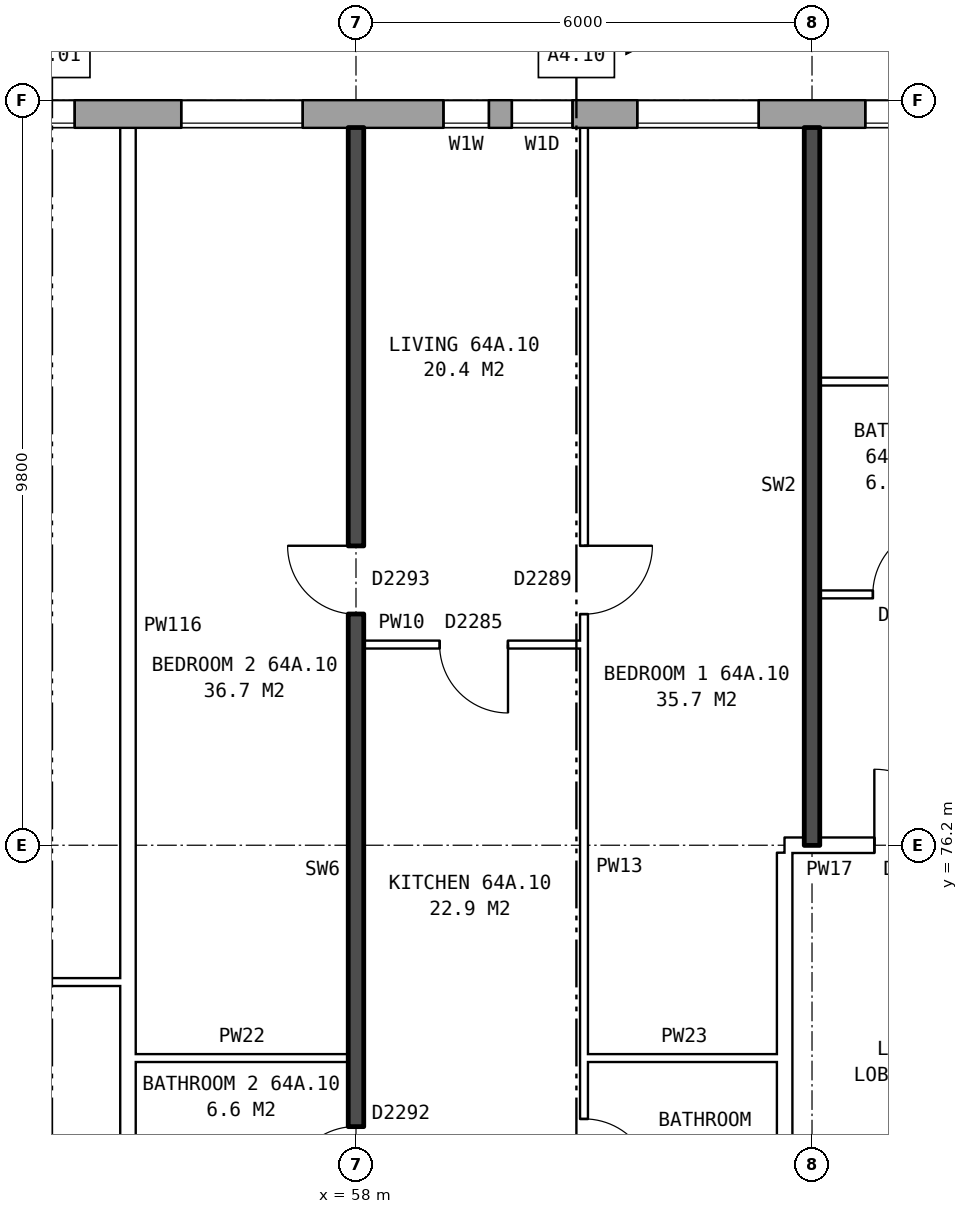
"""IFC4 building model, lengths in metres.
Left out: names, types, materials, properties, quantities, classifications, styles, units other than length and angle.
Written with IfcOpenShell. Run it as: python <this file> out.ifc"""

import sys

from ifc_helpers import new_model, si_unit, direction, frame, frame_2d, origin, place, context, subcontext, project, spatial, rectangle, extrude, element, fill, save


model = new_model("IFC4")
c1 = context("Model", 3, precision=1e-05, world=origin(), true_north=direction((0.0, 1.0)))
c2 = subcontext(c1, "Body", "Model", "MODEL_VIEW")
j1 = project(units=[si_unit("LENGTHUNIT", "METRE"), si_unit("PLANEANGLEUNIT", "RADIAN")], contexts=[c1])
p1 = place(None, origin())
s1 = spatial("IfcSite", under=j1, at=p1, CompositionType="ELEMENT")
p2 = place(p1, origin())
s2 = spatial("IfcBuilding", under=s1, at=p2, CompositionType="ELEMENT")
p3 = place(p2, frame((0.0, 0.0, 227.6)))
s3 = spatial("IfcBuildingStorey", under=s2, at=p3, CompositionType="ELEMENT", Elevation=227.6)
p4 = place(p3, frame((74.95, 85.82, 0.0), z_axis=(0.0, 0.0, 1.0), x_axis=(-1.0, 0.0, 0.0)))
e1 = element("IfcWall", 1, at=p4, inside=s3, PredefinedType="STANDARD", context=c2, shape_type="SweptSolid", body=[
    extrude(rectangle(XDim=39.875, YDim=0.36, at=frame_2d((19.938, 0.0))), origin(), (0.0, 0.0, 1.0), 2.85),
])
p5 = place(p4, frame((2.65, 0.0, 0.8)))
e2 = element("IfcOpeningElement", 2, at=p5, cuts=e1, PredefinedType="OPENING", context=c2, shape_type="SweptSolid", body=[
    extrude(rectangle(XDim=1.6, YDim=1.8, at=frame_2d((0.8, 0.9))), frame((0.0, 0.19, 0.0), z_axis=(0.0, -1.0, 0.0), x_axis=(1.0, 0.0, 0.0)), (0.0, 0.0, 1.0), 0.38),
])
p6 = place(p4, frame((5.65, 0.0, 0.8)))
e3 = element("IfcOpeningElement", 3, at=p6, cuts=e1, PredefinedType="OPENING", context=c2, shape_type="SweptSolid", body=[
    extrude(rectangle(XDim=1.6, YDim=1.8, at=frame_2d((0.8, 0.9))), frame((0.0, 0.19, 0.0), z_axis=(0.0, -1.0, 0.0), x_axis=(1.0, 0.0, 0.0)), (0.0, 0.0, 1.0), 0.38),
])
p7 = place(p4, frame((8.65, 0.0, 0.8)))
e4 = element("IfcOpeningElement", 4, at=p7, cuts=e1, PredefinedType="OPENING", context=c2, shape_type="SweptSolid", body=[
    extrude(rectangle(XDim=1.6, YDim=1.8, at=frame_2d((0.8, 0.9))), frame((0.0, 0.19, 0.0), z_axis=(0.0, -1.0, 0.0), x_axis=(1.0, 0.0, 0.0)), (0.0, 0.0, 1.0), 0.38),
])
p8 = place(p4, frame((11.65, 0.0, 0.8)))
e5 = element("IfcOpeningElement", 5, at=p8, cuts=e1, PredefinedType="OPENING", context=c2, shape_type="SweptSolid", body=[
    extrude(rectangle(XDim=1.6, YDim=1.8, at=frame_2d((0.8, 0.9))), frame((0.0, 0.19, 0.0), z_axis=(0.0, -1.0, 0.0), x_axis=(1.0, 0.0, 0.0)), (0.0, 0.0, 1.0), 0.38),
])
p9 = place(p4, frame((14.1, 0.0, 0.8)))
e6 = element("IfcOpeningElement", 6, at=p9, cuts=e1, PredefinedType="OPENING", context=c2, shape_type="SweptSolid", body=[
    extrude(rectangle(XDim=0.8, YDim=1.8, at=frame_2d((0.4, 0.9))), frame((0.0, 0.19, 0.0), z_axis=(0.0, -1.0, 0.0), x_axis=(1.0, 0.0, 0.0)), (0.0, 0.0, 1.0), 0.38),
])
p10 = place(p4, frame((17.65, 0.0, 0.8)))
e7 = element("IfcOpeningElement", 7, at=p10, cuts=e1, PredefinedType="OPENING", context=c2, shape_type="SweptSolid", body=[
    extrude(rectangle(XDim=1.6, YDim=1.8, at=frame_2d((0.8, 0.9))), frame((0.0, 0.19, 0.0), z_axis=(0.0, -1.0, 0.0), x_axis=(1.0, 0.0, 0.0)), (0.0, 0.0, 1.0), 0.38),
])
p11 = place(p4, frame((20.65, 0.0, 0.8)))
e8 = element("IfcOpeningElement", 8, at=p11, cuts=e1, PredefinedType="OPENING", context=c2, shape_type="SweptSolid", body=[
    extrude(rectangle(XDim=1.6, YDim=1.8, at=frame_2d((0.8, 0.9))), frame((0.0, 0.19, 0.0), z_axis=(0.0, -1.0, 0.0), x_axis=(1.0, 0.0, 0.0)), (0.0, 0.0, 1.0), 0.38),
])
p12 = place(p4, frame((23.15, 0.0, 0.75)))
e9 = element("IfcOpeningElement", 9, at=p12, cuts=e1, PredefinedType="OPENING", context=c2, shape_type="SweptSolid", body=[
    extrude(rectangle(XDim=1.2, YDim=1.8, at=frame_2d((0.6, 0.9))), frame((0.0, 0.19, 0.0), z_axis=(0.0, -1.0, 0.0), x_axis=(1.0, 0.0, 0.0)), (0.0, 0.0, 1.0), 0.38),
])
p13 = place(p4, frame((26.65, 0.0, 0.8)))
e10 = element("IfcOpeningElement", 10, at=p13, cuts=e1, PredefinedType="OPENING", context=c2, shape_type="SweptSolid", body=[
    extrude(rectangle(XDim=1.6, YDim=1.8, at=frame_2d((0.8, 0.9))), frame((0.0, 0.19, 0.0), z_axis=(0.0, -1.0, 0.0), x_axis=(1.0, 0.0, 0.0)), (0.0, 0.0, 1.0), 0.38),
])
p14 = place(p4, frame((29.65, 0.0, 0.8)))
e11 = element("IfcOpeningElement", 11, at=p14, cuts=e1, PredefinedType="OPENING", context=c2, shape_type="SweptSolid", body=[
    extrude(rectangle(XDim=1.6, YDim=1.8, at=frame_2d((0.8, 0.9))), frame((0.0, 0.19, 0.0), z_axis=(0.0, -1.0, 0.0), x_axis=(1.0, 0.0, 0.0)), (0.0, 0.0, 1.0), 0.38),
])
p15 = place(p4, frame((32.65, 0.0, 0.8)))
e12 = element("IfcOpeningElement", 12, at=p15, cuts=e1, PredefinedType="OPENING", context=c2, shape_type="SweptSolid", body=[
    extrude(rectangle(XDim=1.6, YDim=1.8, at=frame_2d((0.8, 0.9))), frame((0.0, 0.19, 0.0), z_axis=(0.0, -1.0, 0.0), x_axis=(1.0, 0.0, 0.0)), (0.0, 0.0, 1.0), 0.38),
])
p16 = place(p4, frame((35.65, 0.0, 0.8)))
e13 = element("IfcOpeningElement", 13, at=p16, cuts=e1, PredefinedType="OPENING", context=c2, shape_type="SweptSolid", body=[
    extrude(rectangle(XDim=1.6, YDim=1.8, at=frame_2d((0.8, 0.9))), frame((0.0, 0.19, 0.0), z_axis=(0.0, -1.0, 0.0), x_axis=(1.0, 0.0, 0.0)), (0.0, 0.0, 1.0), 0.38),
])
p17 = place(p4, frame((15.2, 0.0, 1.7)))
e14 = element("IfcOpeningElement", 14, at=p17, cuts=e1, PredefinedType="OPENING", context=c2, shape_type="SweptSolid", body=[
    extrude(rectangle(XDim=0.6, YDim=0.9, at=frame_2d((0.3, 0.45))), frame((0.0, 0.19, 0.0), z_axis=(0.0, -1.0, 0.0), x_axis=(1.0, 0.0, 0.0)), (0.0, 0.0, 1.0), 0.38),
])
p18 = place(p4, frame((24.65, 0.0, 0.35)))
e15 = element("IfcOpeningElement", 15, at=p18, cuts=e1, PredefinedType="OPENING", context=c2, shape_type="SweptSolid", body=[
    extrude(rectangle(XDim=0.6, YDim=0.9, at=frame_2d((0.3, 0.45))), frame((0.0, 0.19, 0.0), z_axis=(0.0, -1.0, 0.0), x_axis=(1.0, 0.0, 0.0)), (0.0, 0.0, 1.0), 0.38),
])
p19 = place(p3, frame((63.64, 63.9, 0.0), z_axis=(0.0, 0.0, 1.0), x_axis=(0.0, 1.0, 0.0)))
e16 = element("IfcWall", 16, at=p19, inside=s3, PredefinedType="PARTITIONING", context=c2, shape_type="SweptSolid", body=[
    extrude(rectangle(XDim=12.2, YDim=0.2, at=frame_2d((6.1, 0.0))), origin(), (0.0, 0.0, 1.0), 2.85),
])
p20 = place(p19, frame((5.1, 0.0, 0.0)))
e17 = element("IfcOpeningElement", 17, at=p20, cuts=e16, PredefinedType="OPENING", context=c2, shape_type="SweptSolid", body=[
    extrude(rectangle(XDim=2.0, YDim=2.1, at=frame_2d((1.0, 1.05))), frame((0.0, 0.11, 0.0), z_axis=(0.0, -1.0, 0.0), x_axis=(1.0, 0.0, 0.0)), (0.0, 0.0, 1.0), 0.22),
])
p21 = place(p3, frame((55.1, 73.4, 0.0), z_axis=(0.0, 0.0, 1.0), x_axis=(1.0, 0.0, 0.0)))
e18 = element("IfcWall", 18, at=p21, inside=s3, PredefinedType="PARTITIONING", context=c2, shape_type="SweptSolid", body=[
    extrude(rectangle(XDim=2.8, YDim=0.1, at=frame_2d((1.4, 0.0))), origin(), (0.0, 0.0, 1.0), 2.85),
])
p22 = place(p3, frame((61.0, 73.4, 0.0), z_axis=(0.0, 0.0, 1.0), x_axis=(1.0, 0.0, 0.0)))
e19 = element("IfcWall", 19, at=p22, inside=s3, PredefinedType="PARTITIONING", context=c2, shape_type="SweptSolid", body=[
    extrude(rectangle(XDim=2.64, YDim=0.1, at=frame_2d((1.32, 0.0))), origin(), (0.0, 0.0, 1.0), 2.85),
])
p23 = place(p3, frame((52.1, 74.4, 0.0), z_axis=(0.0, 0.0, 1.0), x_axis=(1.0, 0.0, 0.0)))
e20 = element("IfcWall", 20, at=p23, inside=s3, PredefinedType="PARTITIONING", context=c2, shape_type="SweptSolid", body=[
    extrude(rectangle(XDim=2.8, YDim=0.1, at=frame_2d((1.4, 0.0))), origin(), (0.0, 0.0, 1.0), 2.85),
])
p24 = place(p3, frame((63.64, 76.2, 0.0), z_axis=(0.0, 0.0, 1.0), x_axis=(1.0, 0.0, 0.0)))
e21 = element("IfcWall", 21, at=p24, inside=s3, PredefinedType="PARTITIONING", context=c2, shape_type="SweptSolid", body=[
    extrude(rectangle(XDim=3.0, YDim=0.2, at=frame_2d((1.5, 0.0))), origin(), (0.0, 0.0, 1.0), 2.85),
])
p25 = place(p24, frame((1.18, 0.0, 0.0)))
e22 = element("IfcOpeningElement", 22, at=p25, cuts=e21, PredefinedType="OPENING", context=c2, shape_type="SweptSolid", body=[
    extrude(rectangle(XDim=1.0, YDim=2.1, at=frame_2d((0.5, 1.05))), frame((0.0, 0.11, 0.0), z_axis=(0.0, -1.0, 0.0), x_axis=(1.0, 0.0, 0.0)), (0.0, 0.0, 1.0), 0.22),
])
p26 = place(p3, frame((58.1, 78.84, 0.0), z_axis=(0.0, 0.0, 1.0), x_axis=(1.0, 0.0, 0.0)))
e23 = element("IfcWall", 23, at=p26, inside=s3, PredefinedType="PARTITIONING", context=c2, shape_type="SweptSolid", body=[
    extrude(rectangle(XDim=2.9, YDim=0.1, at=frame_2d((1.45, 0.0))), origin(), (0.0, 0.0, 1.0), 2.85),
])
p27 = place(p26, frame((1.0, 0.0, 0.0)))
e24 = element("IfcOpeningElement", 24, at=p27, cuts=e23, PredefinedType="OPENING", context=c2, shape_type="SweptSolid", body=[
    extrude(rectangle(XDim=0.9, YDim=2.1, at=frame_2d((0.45, 1.05))), frame((0.0, 0.06, 0.0), z_axis=(0.0, -1.0, 0.0), x_axis=(1.0, 0.0, 0.0)), (0.0, 0.0, 1.0), 0.12),
])
p28 = place(p3, frame((64.1, 79.5, 0.0), z_axis=(0.0, 0.0, 1.0), x_axis=(1.0, 0.0, 0.0)))
e25 = element("IfcWall", 25, at=p28, inside=s3, PredefinedType="PARTITIONING", context=c2, shape_type="SweptSolid", body=[
    extrude(rectangle(XDim=11.8, YDim=0.1, at=frame_2d((5.9, 0.0))), origin(), (0.0, 0.0, 1.0), 2.85),
])
p29 = place(p28, frame((3.65, 0.0, 0.0)))
e26 = element("IfcOpeningElement", 26, at=p29, cuts=e25, PredefinedType="OPENING", context=c2, shape_type="SweptSolid", body=[
    extrude(rectangle(XDim=0.9, YDim=2.1, at=frame_2d((0.45, 1.05))), frame((0.0, 0.06, 0.0), z_axis=(0.0, -1.0, 0.0), x_axis=(1.0, 0.0, 0.0)), (0.0, 0.0, 1.0), 0.12),
])
p30 = place(p28, frame((0.7, 0.0, 0.0)))
e27 = element("IfcOpeningElement", 27, at=p30, cuts=e25, PredefinedType="OPENING", context=c2, shape_type="SweptSolid", body=[
    extrude(rectangle(XDim=0.9, YDim=2.1, at=frame_2d((0.45, 1.05))), frame((0.0, 0.06, 0.0), z_axis=(0.0, -1.0, 0.0), x_axis=(1.0, 0.0, 0.0)), (0.0, 0.0, 1.0), 0.12),
])
p31 = place(p3, frame((64.1, 82.3, 0.0), z_axis=(0.0, 0.0, 1.0), x_axis=(1.0, 0.0, 0.0)))
e28 = element("IfcWall", 28, at=p31, inside=s3, PredefinedType="PARTITIONING", context=c2, shape_type="SweptSolid", body=[
    extrude(rectangle(XDim=2.3, YDim=0.1, at=frame_2d((1.15, 0.0))), origin(), (0.0, 0.0, 1.0), 2.85),
])
p32 = place(p3, frame((55.0, 71.3, 0.0), z_axis=(0.0, 0.0, 1.0), x_axis=(0.0, 1.0, 0.0)))
e29 = element("IfcWall", 29, at=p32, inside=s3, PredefinedType="PARTITIONING", context=c2, shape_type="SweptSolid", body=[
    extrude(rectangle(XDim=14.34, YDim=0.2, at=frame_2d((7.17, 0.0))), origin(), (0.0, 0.0, 1.0), 2.85),
])
p33 = place(p3, frame((58.0, 71.2, 0.0), z_axis=(0.0, 0.0, 1.0), x_axis=(0.0, 1.0, 0.0)))
e30 = element("IfcWall", 30, at=p33, inside=s3, PredefinedType="SOLIDWALL", context=c2, shape_type="SweptSolid", body=[
    extrude(rectangle(XDim=14.44, YDim=0.2, at=frame_2d((7.22, 0.0))), origin(), (0.0, 0.0, 1.0), 2.85),
])
p34 = place(p33, frame((8.04, 0.0, 0.0)))
e31 = element("IfcOpeningElement", 31, at=p34, cuts=e30, PredefinedType="OPENING", context=c2, shape_type="SweptSolid", body=[
    extrude(rectangle(XDim=0.9, YDim=2.1, at=frame_2d((0.45, 1.05))), frame((0.0, 0.11, 0.0), z_axis=(0.0, -1.0, 0.0), x_axis=(1.0, 0.0, 0.0)), (0.0, 0.0, 1.0), 0.22),
])
p35 = place(p33, frame((0.4, 0.0, 0.0)))
e32 = element("IfcOpeningElement", 32, at=p35, cuts=e30, PredefinedType="OPENING", context=c2, shape_type="SweptSolid", body=[
    extrude(rectangle(XDim=0.9, YDim=2.1, at=frame_2d((0.45, 1.05))), frame((0.0, 0.11, 0.0), z_axis=(0.0, -1.0, 0.0), x_axis=(1.0, 0.0, 0.0)), (0.0, 0.0, 1.0), 0.22),
])
p36 = place(p3, frame((61.0, 71.3, 0.0), z_axis=(0.0, 0.0, 1.0), x_axis=(0.0, 1.0, 0.0)))
e33 = element("IfcWall", 33, at=p36, inside=s3, PredefinedType="PARTITIONING", context=c2, shape_type="SweptSolid", body=[
    extrude(rectangle(XDim=14.34, YDim=0.1, at=frame_2d((7.17, 0.0))), origin(), (0.0, 0.0, 1.0), 2.85),
])
p37 = place(p36, frame((7.94, 0.0, 0.0)))
e34 = element("IfcOpeningElement", 34, at=p37, cuts=e33, PredefinedType="OPENING", context=c2, shape_type="SweptSolid", body=[
    extrude(rectangle(XDim=0.9, YDim=2.1, at=frame_2d((0.45, 1.05))), frame((0.0, 0.06, 0.0), z_axis=(0.0, -1.0, 0.0), x_axis=(1.0, 0.0, 0.0)), (0.0, 0.0, 1.0), 0.12),
])
p38 = place(p36, frame((0.4, 0.0, 0.0)))
e35 = element("IfcOpeningElement", 35, at=p38, cuts=e33, PredefinedType="OPENING", context=c2, shape_type="SweptSolid", body=[
    extrude(rectangle(XDim=0.9, YDim=2.1, at=frame_2d((0.45, 1.05))), frame((0.0, 0.06, 0.0), z_axis=(0.0, -1.0, 0.0), x_axis=(1.0, 0.0, 0.0)), (0.0, 0.0, 1.0), 0.12),
])
p39 = place(p3, frame((64.0, 76.2, 0.0), z_axis=(0.0, 0.0, 1.0), x_axis=(0.0, 1.0, 0.0)))
e36 = element("IfcWall", 36, at=p39, inside=s3, PredefinedType="SOLIDWALL", context=c2, shape_type="SweptSolid", body=[
    extrude(rectangle(XDim=9.44, YDim=0.2, at=frame_2d((4.72, 0.0))), origin(), (0.0, 0.0, 1.0), 2.85),
])
p40 = place(p7, origin())
e37 = element("IfcWindow", 37, at=p40, inside=s3, PartitioningType="SINGLE_PANEL", PredefinedType="WINDOW", context=c2, shape_type="SweptSolid", body=[
    extrude(rectangle(XDim=1.6, YDim=1.8, at=frame_2d((0.8, 0.9))), frame((0.0, 0.15, 0.0), z_axis=(0.0, -1.0, 0.0), x_axis=(1.0, 0.0, 0.0)), (0.0, 0.0, 1.0), 0.06),
])
fill(e4, e37)
p41 = place(p8, origin())
e38 = element("IfcWindow", 38, at=p41, inside=s3, PartitioningType="SINGLE_PANEL", PredefinedType="WINDOW", context=c2, shape_type="SweptSolid", body=[
    extrude(rectangle(XDim=1.6, YDim=1.8, at=frame_2d((0.8, 0.9))), frame((0.0, 0.15, 0.0), z_axis=(0.0, -1.0, 0.0), x_axis=(1.0, 0.0, 0.0)), (0.0, 0.0, 1.0), 0.06),
])
fill(e5, e38)
p42 = place(p9, origin())
e39 = element("IfcWindow", 39, at=p42, inside=s3, PartitioningType="SINGLE_PANEL", PredefinedType="WINDOW", context=c2, shape_type="SweptSolid", body=[
    extrude(rectangle(XDim=0.8, YDim=1.8, at=frame_2d((0.4, 0.9))), frame((0.0, 0.15, 0.0), z_axis=(0.0, -1.0, 0.0), x_axis=(1.0, 0.0, 0.0)), (0.0, 0.0, 1.0), 0.06),
])
fill(e6, e39)
p43 = place(p10, origin())
e40 = element("IfcWindow", 40, at=p43, inside=s3, PartitioningType="SINGLE_PANEL", PredefinedType="WINDOW", context=c2, shape_type="SweptSolid", body=[
    extrude(rectangle(XDim=1.6, YDim=1.8, at=frame_2d((0.8, 0.9))), frame((0.0, 0.15, 0.0), z_axis=(0.0, -1.0, 0.0), x_axis=(1.0, 0.0, 0.0)), (0.0, 0.0, 1.0), 0.06),
])
fill(e7, e40)
p44 = place(p11, origin())
e41 = element("IfcWindow", 41, at=p44, inside=s3, PartitioningType="SINGLE_PANEL", PredefinedType="WINDOW", context=c2, shape_type="SweptSolid", body=[
    extrude(rectangle(XDim=1.6, YDim=1.8, at=frame_2d((0.8, 0.9))), frame((0.0, 0.15, 0.0), z_axis=(0.0, -1.0, 0.0), x_axis=(1.0, 0.0, 0.0)), (0.0, 0.0, 1.0), 0.06),
])
fill(e8, e41)
p45 = place(p25, origin())
e42 = element("IfcDoor", 42, at=p45, inside=s3, OperationType="SINGLE_SWING_LEFT", PredefinedType="DOOR", context=c2, shape_type="SweptSolid", body=[
    extrude(rectangle(XDim=1.0, YDim=2.1, at=frame_2d((0.5, 1.05))), frame((0.0, 0.025, 0.0), z_axis=(0.0, -1.0, 0.0), x_axis=(1.0, 0.0, 0.0)), (0.0, 0.0, 1.0), 0.05),
])
fill(e22, e42)
p46 = place(p30, origin())
e43 = element("IfcDoor", 43, at=p46, inside=s3, OperationType="SINGLE_SWING_RIGHT", PredefinedType="DOOR", context=c2, shape_type="SweptSolid", body=[
    extrude(rectangle(XDim=0.9, YDim=2.1, at=frame_2d((0.45, 1.05))), frame((0.0, 0.025, 0.0), z_axis=(0.0, -1.0, 0.0), x_axis=(1.0, 0.0, 0.0)), (0.0, 0.0, 1.0), 0.05),
])
fill(e27, e43)
p47 = place(p37, frame((0.9, 0.0, 0.0), z_axis=(0.0, 0.0, 1.0), x_axis=(-1.0, 0.0, 0.0)))
e44 = element("IfcDoor", 44, at=p47, inside=s3, OperationType="SINGLE_SWING_LEFT", PredefinedType="DOOR", context=c2, shape_type="SweptSolid", body=[
    extrude(rectangle(XDim=0.9, YDim=2.1, at=frame_2d((0.45, 1.05))), frame((0.0, 0.025, 0.0), z_axis=(0.0, -1.0, 0.0), x_axis=(1.0, 0.0, 0.0)), (0.0, 0.0, 1.0), 0.05),
])
fill(e34, e44)
p48 = place(p34, origin())
e45 = element("IfcDoor", 45, at=p48, inside=s3, OperationType="SINGLE_SWING_RIGHT", PredefinedType="DOOR", context=c2, shape_type="SweptSolid", body=[
    extrude(rectangle(XDim=0.9, YDim=2.1, at=frame_2d((0.45, 1.05))), frame((0.0, 0.025, 0.0), z_axis=(0.0, -1.0, 0.0), x_axis=(1.0, 0.0, 0.0)), (0.0, 0.0, 1.0), 0.05),
])
fill(e31, e45)
p49 = place(p27, frame((0.9, 0.0, 0.0), z_axis=(0.0, 0.0, 1.0), x_axis=(-1.0, 0.0, 0.0)))
e46 = element("IfcDoor", 46, at=p49, inside=s3, OperationType="SINGLE_SWING_LEFT", PredefinedType="DOOR", context=c2, shape_type="SweptSolid", body=[
    extrude(rectangle(XDim=0.9, YDim=2.1, at=frame_2d((0.45, 1.05))), frame((0.0, 0.025, 0.0), z_axis=(0.0, -1.0, 0.0), x_axis=(1.0, 0.0, 0.0)), (0.0, 0.0, 1.0), 0.05),
])
fill(e24, e46)
p50 = place(p38, frame((0.9, 0.0, 0.0), z_axis=(0.0, 0.0, 1.0), x_axis=(-1.0, 0.0, 0.0)))
e47 = element("IfcDoor", 47, at=p50, inside=s3, OperationType="SINGLE_SWING_RIGHT", PredefinedType="DOOR", context=c2, shape_type="SweptSolid", body=[
    extrude(rectangle(XDim=0.9, YDim=2.1, at=frame_2d((0.45, 1.05))), frame((0.0, 0.025, 0.0), z_axis=(0.0, -1.0, 0.0), x_axis=(1.0, 0.0, 0.0)), (0.0, 0.0, 1.0), 0.05),
])
fill(e35, e47)
p51 = place(p35, origin())
e48 = element("IfcDoor", 48, at=p51, inside=s3, OperationType="SINGLE_SWING_LEFT", PredefinedType="DOOR", context=c2, shape_type="SweptSolid", body=[
    extrude(rectangle(XDim=0.9, YDim=2.1, at=frame_2d((0.45, 1.05))), frame((0.0, 0.025, 0.0), z_axis=(0.0, -1.0, 0.0), x_axis=(1.0, 0.0, 0.0)), (0.0, 0.0, 1.0), 0.05),
])
fill(e32, e48)
p52 = place(p17, origin())
e49 = element("IfcWindow", 49, at=p52, inside=s3, PartitioningType="SINGLE_PANEL", PredefinedType="WINDOW", context=c2, shape_type="SweptSolid", body=[
    extrude(rectangle(XDim=0.6, YDim=0.9, at=frame_2d((0.3, 0.45))), frame((0.0, 0.15, 0.0), z_axis=(0.0, -1.0, 0.0), x_axis=(1.0, 0.0, 0.0)), (0.0, 0.0, 1.0), 0.06),
])
fill(e14, e49)
save(model, sys.argv[1])
